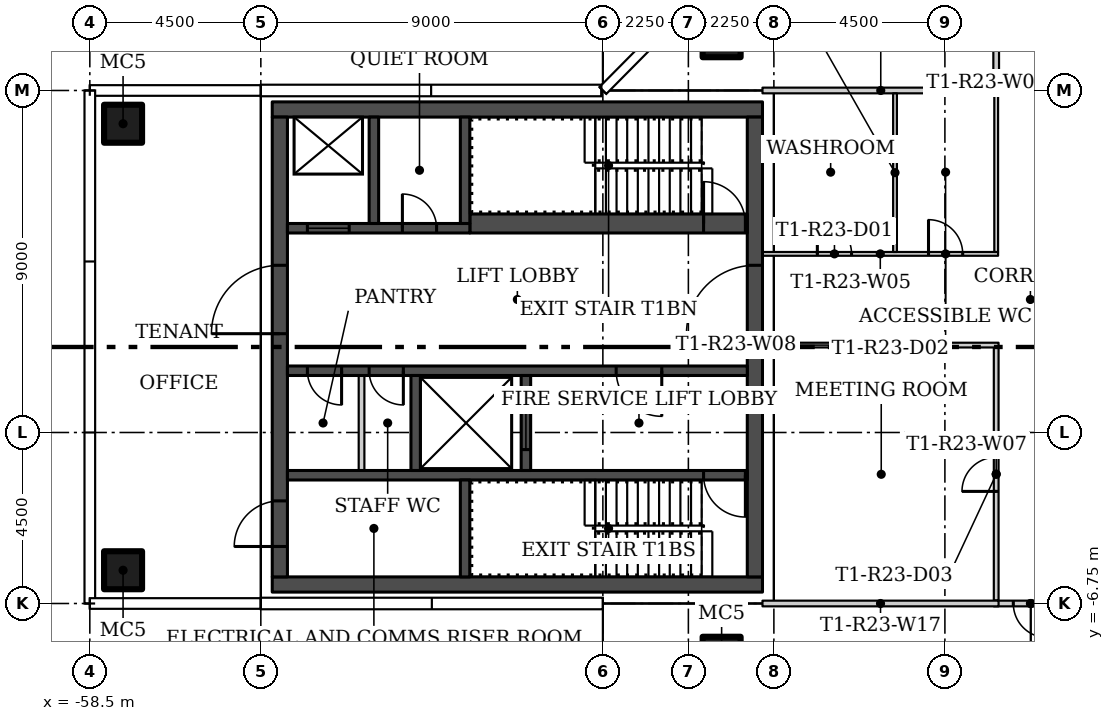
"""IFC4 building model, lengths in metres.
Left out: names, types, materials, properties, quantities, classifications, styles, units other than length and angle.
Written with IfcOpenShell. Run it as: python <this file> out.ifc"""

import sys

from ifc_helpers import new_model, si_unit, direction, frame, frame_2d, origin, origin_2d, place, context, subcontext, project, spatial, rectangle, hollow_rectangle, extrude, element, fill, save


model = new_model("IFC4")
c1 = context("Model", 3, precision=1e-05, world=origin(), true_north=direction((0.0, 1.0)))
c2 = subcontext(c1, "Body", "Model", "MODEL_VIEW")
j1 = project(units=[si_unit("LENGTHUNIT", "METRE"), si_unit("PLANEANGLEUNIT", "RADIAN")], contexts=[c1])
p1 = place(None, origin())
s1 = spatial("IfcSite", under=j1, at=p1, CompositionType="ELEMENT")
p2 = place(p1, origin())
s2 = spatial("IfcBuilding", under=s1, at=p2, CompositionType="ELEMENT")
p3 = place(p2, frame((0.0, 0.0, 210.0)))
s3 = spatial("IfcBuildingStorey", under=s2, at=p3, CompositionType="ELEMENT", Elevation=210.0)
for number, where in (
    (1, (-41.875, 8.125, 0.0)),
    (2, (-41.875, -8.125, 0.0)),
    (3, (-57.625, -5.875, 0.0)),
    (4, (-57.625, 5.875, 0.0)),
):
    element("IfcColumn", number, at=place(p3, frame(where)), inside=s3, PredefinedType="COLUMN", context=c2, shape_type="SweptSolid", body=[
        extrude(hollow_rectangle(XDim=1.0, YDim=1.0, WallThickness=0.04, at=origin_2d()), origin(), (0.0, 0.0, 1.0), 3.55),
    ])
p4 = place(p3, frame((-40.8, 2.45, 0.0)))
e5 = element("IfcWall", 5, at=p4, inside=s3, PredefinedType="PARTITIONING", context=c2, shape_type="SweptSolid", body=[
    extrude(rectangle(XDim=6.2, YDim=0.1, at=frame_2d((3.1, 0.0))), origin(), (0.0, 0.0, 1.0), 3.55),
])
p5 = place(p4, frame((1.444, 0.0, 0.0)))
e6 = element("IfcOpeningElement", 6, at=p5, cuts=e5, PredefinedType="OPENING", context=c2, shape_type="SweptSolid", body=[
    extrude(rectangle(XDim=0.9, YDim=2.1, at=frame_2d((0.45, 1.05))), frame((0.0, 0.06, 0.0), z_axis=(0.0, -1.0, 0.0), x_axis=(1.0, 0.0, 0.0)), (0.0, 0.0, 1.0), 0.12),
])
p6 = place(p4, frame((4.368, 0.0, 0.0)))
e7 = element("IfcOpeningElement", 7, at=p6, cuts=e5, PredefinedType="OPENING", context=c2, shape_type="SweptSolid", body=[
    extrude(rectangle(XDim=0.9, YDim=2.1, at=frame_2d((0.45, 1.05))), frame((0.0, 0.06, 0.0), z_axis=(0.0, -1.0, 0.0), x_axis=(1.0, 0.0, 0.0)), (0.0, 0.0, 1.0), 0.12),
])
p7 = place(p3, frame((-34.65, 2.5, 0.0), z_axis=(0.0, 0.0, 1.0), x_axis=(0.0, 1.0, 0.0)))
e8 = element("IfcWall", 8, at=p7, inside=s3, PredefinedType="PARTITIONING", context=c2, shape_type="SweptSolid", body=[
    extrude(rectangle(XDim=4.175, YDim=0.1, at=frame_2d((2.087, 0.0))), origin(), (0.0, 0.0, 1.0), 3.55),
])
p8 = place(p3, frame((-34.65, -6.675, 0.0), z_axis=(0.0, 0.0, 1.0), x_axis=(0.0, 1.0, 0.0)))
e9 = element("IfcWall", 9, at=p8, inside=s3, PredefinedType="PARTITIONING", context=c2, shape_type="SweptSolid", body=[
    extrude(rectangle(XDim=6.662, YDim=0.125, at=frame_2d((3.331, 0.0))), origin(), (0.0, 0.0, 1.0), 3.55),
])
p9 = place(p8, frame((2.875, 0.0, 0.0)))
e10 = element("IfcOpeningElement", 10, at=p9, cuts=e9, PredefinedType="OPENING", context=c2, shape_type="SweptSolid", body=[
    extrude(rectangle(XDim=0.9, YDim=2.1, at=frame_2d((0.45, 1.05))), frame((0.0, 0.073, 0.0), z_axis=(0.0, -1.0, 0.0), x_axis=(1.0, 0.0, 0.0)), (0.0, 0.0, 1.0), 0.145),
])
p10 = place(p3, frame((-34.588, 0.05, 0.0), z_axis=(0.0, 0.0, 1.0), x_axis=(-1.0, 0.0, 0.0)))
e11 = element("IfcWall", 11, at=p10, inside=s3, PredefinedType="PARTITIONING", context=c2, shape_type="SweptSolid", body=[
    extrude(rectangle(XDim=6.212, YDim=0.125, at=frame_2d((3.106, 0.0))), origin(), (0.0, 0.0, 1.0), 3.55),
])
p11 = place(p3, frame((-34.65, 6.825, 0.0), z_axis=(0.0, 0.0, 1.0), x_axis=(0.0, 1.0, 0.0)))
e12 = element("IfcWall", 12, at=p11, inside=s3, PredefinedType="PARTITIONING", context=c2, shape_type="SweptSolid", body=[
    extrude(rectangle(XDim=4.35, YDim=0.15, at=frame_2d((2.175, 0.0))), origin(), (0.0, 0.0, 1.0), 3.55),
])
p12 = place(p11, frame((1.425, 0.0, 0.0)))
e13 = element("IfcOpeningElement", 13, at=p12, cuts=e12, PredefinedType="OPENING", context=c2, shape_type="SweptSolid", body=[
    extrude(rectangle(XDim=1.5, YDim=2.1, at=frame_2d((0.75, 1.05))), frame((0.0, 0.085, 0.0), z_axis=(0.0, -1.0, 0.0), x_axis=(1.0, 0.0, 0.0)), (0.0, 0.0, 1.0), 0.17),
])
p13 = place(p3, frame((-32.75, -6.75, 0.0), z_axis=(0.0, 0.0, 1.0), x_axis=(-1.0, 0.0, 0.0)))
e14 = element("IfcWall", 14, at=p13, inside=s3, PredefinedType="PARTITIONING", context=c2, shape_type="SweptSolid", body=[
    extrude(rectangle(XDim=1.963, YDim=0.15, at=frame_2d((0.982, 0.0))), origin(), (0.0, 0.0, 1.0), 3.55),
])
p14 = place(p13, frame((0.55, 0.0, 0.0)))
e15 = element("IfcOpeningElement", 15, at=p14, cuts=e14, PredefinedType="OPENING", context=c2, shape_type="SweptSolid", body=[
    extrude(rectangle(XDim=0.9, YDim=2.1, at=frame_2d((0.45, 1.05))), frame((0.0, 0.085, 0.0), z_axis=(0.0, -1.0, 0.0), x_axis=(1.0, 0.0, 0.0)), (0.0, 0.0, 1.0), 0.17),
])
p15 = place(p3, frame((-34.575, 6.75, 0.0), z_axis=(0.0, 0.0, 1.0), x_axis=(-1.0, 0.0, 0.0)))
e16 = element("IfcWall", 16, at=p15, inside=s3, PredefinedType="PARTITIONING", context=c2, shape_type="SweptSolid", body=[
    extrude(rectangle(XDim=6.225, YDim=0.15, at=frame_2d((3.112, 0.0))), origin(), (0.0, 0.0, 1.0), 3.55),
])
p16 = place(p3, frame((-37.312, 2.5, 0.0), z_axis=(0.0, 0.0, 1.0), x_axis=(0.0, 1.0, 0.0)))
e17 = element("IfcWall", 17, at=p16, inside=s3, PredefinedType="PARTITIONING", context=c2, shape_type="SweptSolid", body=[
    extrude(rectangle(XDim=4.175, YDim=0.1, at=frame_2d((2.087, 0.0))), origin(), (0.0, 0.0, 1.0), 3.55),
])
p17 = place(p3, frame((-40.8, -6.75, 0.0)))
e18 = element("IfcWall", 18, at=p17, inside=s3, PredefinedType="PARTITIONING", context=c2, shape_type="SweptSolid", body=[
    extrude(rectangle(XDim=6.212, YDim=0.15, at=frame_2d((3.106, 0.0))), origin(), (0.0, 0.0, 1.0), 3.55),
])
for number, where, z_axis, x_axis in (
    (19, (-40.8, -6.25, 0.0), (0.0, 0.0, 1.0), (-1.0, 0.0, 0.0)),
    (20, (-40.8, 6.25, 0.0), (0.0, 0.0, 1.0), (-1.0, 0.0, 0.0)),
):
    element("IfcWall", number, at=place(p3, frame(where, z_axis=z_axis, x_axis=x_axis)), inside=s3, PredefinedType="SHEAR", context=c2, shape_type="SweptSolid", body=[
        extrude(rectangle(XDim=12.9, YDim=0.4, at=frame_2d((6.45, 0.0))), origin(), (0.0, 0.0, 1.0), 3.55),
    ])
p18 = place(p3, frame((-41.0, -6.05, 0.0), z_axis=(0.0, 0.0, 1.0), x_axis=(0.0, 1.0, 0.0)))
e21 = element("IfcWall", 21, at=p18, inside=s3, PredefinedType="SHEAR", context=c2, shape_type="SweptSolid", body=[
    extrude(rectangle(XDim=12.1, YDim=0.4, at=frame_2d((6.05, 0.0))), origin(), (0.0, 0.0, 1.0), 3.55),
])
p19 = place(p18, frame((6.4, 0.0, 0.0)))
e22 = element("IfcOpeningElement", 22, at=p19, cuts=e21, PredefinedType="OPENING", context=c2, shape_type="SweptSolid", body=[
    extrude(rectangle(XDim=1.8, YDim=2.4, at=frame_2d((0.9, 1.2))), frame((0.0, 0.21, 0.0), z_axis=(0.0, -1.0, 0.0), x_axis=(1.0, 0.0, 0.0)), (0.0, 0.0, 1.0), 0.42),
])
p20 = place(p3, frame((-53.5, -6.05, 0.0), z_axis=(0.0, 0.0, 1.0), x_axis=(0.0, 1.0, 0.0)))
e23 = element("IfcWall", 23, at=p20, inside=s3, PredefinedType="SHEAR", context=c2, shape_type="SweptSolid", body=[
    extrude(rectangle(XDim=12.1, YDim=0.4, at=frame_2d((6.05, 0.0))), origin(), (0.0, 0.0, 1.0), 3.55),
])
p21 = place(p20, frame((0.8, 0.0, 0.0)))
e24 = element("IfcOpeningElement", 24, at=p21, cuts=e23, PredefinedType="OPENING", context=c2, shape_type="SweptSolid", body=[
    extrude(rectangle(XDim=1.2, YDim=2.1, at=frame_2d((0.6, 1.05))), frame((0.0, 0.21, 0.0), z_axis=(0.0, -1.0, 0.0), x_axis=(1.0, 0.0, 0.0)), (0.0, 0.0, 1.0), 0.42),
])
p22 = place(p20, frame((6.4, 0.0, 0.0)))
e25 = element("IfcOpeningElement", 25, at=p22, cuts=e23, PredefinedType="OPENING", context=c2, shape_type="SweptSolid", body=[
    extrude(rectangle(XDim=1.8, YDim=2.4, at=frame_2d((0.9, 1.2))), frame((0.0, 0.21, 0.0), z_axis=(0.0, -1.0, 0.0), x_axis=(1.0, 0.0, 0.0)), (0.0, 0.0, 1.0), 0.42),
])
p23 = place(p3, frame((-41.2, -3.375, 0.0), z_axis=(0.0, 0.0, 1.0), x_axis=(-1.0, 0.0, 0.0)))
e26 = element("IfcWall", 26, at=p23, inside=s3, PredefinedType="SHEAR", context=c2, shape_type="SweptSolid", body=[
    extrude(rectangle(XDim=12.1, YDim=0.25, at=frame_2d((6.05, 0.0))), origin(), (0.0, 0.0, 1.0), 3.55),
])
p24 = place(p23, frame((0.05, 0.0, 0.0)))
e27 = element("IfcOpeningElement", 27, at=p24, cuts=e26, PredefinedType="OPENING", context=c2, shape_type="SweptSolid", body=[
    extrude(rectangle(XDim=1.1, YDim=2.1, at=frame_2d((0.55, 1.05))), frame((0.0, 0.135, 0.0), z_axis=(0.0, -1.0, 0.0), x_axis=(1.0, 0.0, 0.0)), (0.0, 0.0, 1.0), 0.27),
])
p25 = place(p3, frame((-48.625, -6.05, 0.0), z_axis=(0.0, 0.0, 1.0), x_axis=(0.0, 1.0, 0.0)))
e28 = element("IfcWall", 28, at=p25, inside=s3, PredefinedType="SHEAR", context=c2, shape_type="SweptSolid", body=[
    extrude(rectangle(XDim=2.55, YDim=0.25, at=frame_2d((1.275, 0.0))), origin(), (0.0, 0.0, 1.0), 3.55),
])
p26 = place(p3, frame((-41.2, -0.625, 0.0), z_axis=(0.0, 0.0, 1.0), x_axis=(-1.0, 0.0, 0.0)))
e29 = element("IfcWall", 29, at=p26, inside=s3, PredefinedType="SHEAR", context=c2, shape_type="SweptSolid", body=[
    extrude(rectangle(XDim=12.1, YDim=0.25, at=frame_2d((6.05, 0.0))), origin(), (0.0, 0.0, 1.0), 3.55),
])
p27 = place(p26, frame((2.25, 0.0, 0.0)))
e30 = element("IfcOpeningElement", 30, at=p27, cuts=e29, PredefinedType="OPENING", context=c2, shape_type="SweptSolid", body=[
    extrude(rectangle(XDim=1.2, YDim=2.1, at=frame_2d((0.6, 1.05))), frame((0.0, 0.135, 0.0), z_axis=(0.0, -1.0, 0.0), x_axis=(1.0, 0.0, 0.0)), (0.0, 0.0, 1.0), 0.27),
])
p28 = place(p26, frame((9.05, 0.0, 0.0)))
e31 = element("IfcOpeningElement", 31, at=p28, cuts=e29, PredefinedType="OPENING", context=c2, shape_type="SweptSolid", body=[
    extrude(rectangle(XDim=0.9, YDim=2.1, at=frame_2d((0.45, 1.05))), frame((0.0, 0.135, 0.0), z_axis=(0.0, -1.0, 0.0), x_axis=(1.0, 0.0, 0.0)), (0.0, 0.0, 1.0), 0.27),
])
p29 = place(p26, frame((10.675, 0.0, 0.0)))
e32 = element("IfcOpeningElement", 32, at=p29, cuts=e29, PredefinedType="OPENING", context=c2, shape_type="SweptSolid", body=[
    extrude(rectangle(XDim=0.9, YDim=2.1, at=frame_2d((0.45, 1.05))), frame((0.0, 0.135, 0.0), z_axis=(0.0, -1.0, 0.0), x_axis=(1.0, 0.0, 0.0)), (0.0, 0.0, 1.0), 0.27),
])
p30 = place(p3, frame((-47.025, -3.25, 0.0), z_axis=(0.0, 0.0, 1.0), x_axis=(0.0, 1.0, 0.0)))
e33 = element("IfcWall", 33, at=p30, inside=s3, PredefinedType="SHEAR", context=c2, shape_type="SweptSolid", body=[
    extrude(rectangle(XDim=2.5, YDim=0.25, at=frame_2d((1.25, 0.0))), origin(), (0.0, 0.0, 1.0), 3.55),
])
p31 = place(p30, frame((0.55, 0.0, 0.0)))
e34 = element("IfcOpeningElement", 34, at=p31, cuts=e33, PredefinedType="OPENING", context=c2, shape_type="SweptSolid", body=[
    extrude(rectangle(XDim=1.4, YDim=2.4, at=frame_2d((0.7, 1.2))), frame((0.0, 0.135, 0.0), z_axis=(0.0, -1.0, 0.0), x_axis=(1.0, 0.0, 0.0)), (0.0, 0.0, 1.0), 0.27),
])
p32 = place(p3, frame((-49.925, -3.25, 0.0), z_axis=(0.0, 0.0, 1.0), x_axis=(0.0, 1.0, 0.0)))
e35 = element("IfcWall", 35, at=p32, inside=s3, PredefinedType="SHEAR", context=c2, shape_type="SweptSolid", body=[
    extrude(rectangle(XDim=2.5, YDim=0.25, at=frame_2d((1.25, 0.0))), origin(), (0.0, 0.0, 1.0), 3.55),
])
p33 = place(p3, frame((-51.35, -3.25, 0.0), z_axis=(0.0, 0.0, 1.0), x_axis=(0.0, 1.0, 0.0)))
e36 = element("IfcWall", 36, at=p33, inside=s3, PredefinedType="PARTITIONING", context=c2, shape_type="SweptSolid", body=[
    extrude(rectangle(XDim=2.5, YDim=0.15, at=frame_2d((1.25, 0.0))), origin(), (0.0, 0.0, 1.0), 3.55),
])
p34 = place(p3, frame((-48.5, 3.25, 0.0)))
e37 = element("IfcWall", 37, at=p34, inside=s3, PredefinedType="SHEAR", context=c2, shape_type="SweptSolid", body=[
    extrude(rectangle(XDim=7.3, YDim=0.5, at=frame_2d((3.65, 0.0))), origin(), (0.0, 0.0, 1.0), 3.55),
])
p35 = place(p34, frame((6.15, 0.0, 0.0)))
e38 = element("IfcOpeningElement", 38, at=p35, cuts=e37, PredefinedType="OPENING", context=c2, shape_type="SweptSolid", body=[
    extrude(rectangle(XDim=1.1, YDim=2.1, at=frame_2d((0.55, 1.05))), frame((0.0, 0.26, 0.0), z_axis=(0.0, -1.0, 0.0), x_axis=(1.0, 0.0, 0.0)), (0.0, 0.0, 1.0), 0.52),
])
p36 = place(p3, frame((-53.3, 3.125, 0.0)))
e39 = element("IfcWall", 39, at=p36, inside=s3, PredefinedType="SHEAR", context=c2, shape_type="SweptSolid", body=[
    extrude(rectangle(XDim=4.8, YDim=0.25, at=frame_2d((2.4, 0.0))), origin(), (0.0, 0.0, 1.0), 3.55),
])
p37 = place(p36, frame((0.525, 0.0, 0.0)))
e40 = element("IfcOpeningElement", 40, at=p37, cuts=e39, PredefinedType="OPENING", context=c2, shape_type="SweptSolid", body=[
    extrude(rectangle(XDim=1.1, YDim=2.1, at=frame_2d((0.55, 1.05))), frame((0.0, 0.135, 0.0), z_axis=(0.0, -1.0, 0.0), x_axis=(1.0, 0.0, 0.0)), (0.0, 0.0, 1.0), 0.27),
])
p38 = place(p36, frame((3.025, 0.0, 0.0)))
e41 = element("IfcOpeningElement", 41, at=p38, cuts=e39, PredefinedType="OPENING", context=c2, shape_type="SweptSolid", body=[
    extrude(rectangle(XDim=0.9, YDim=2.1, at=frame_2d((0.45, 1.05))), frame((0.0, 0.135, 0.0), z_axis=(0.0, -1.0, 0.0), x_axis=(1.0, 0.0, 0.0)), (0.0, 0.0, 1.0), 0.27),
])
for number, where, z_axis, x_axis in (
    (42, (-48.625, 3.25, 0.0), (0.0, 0.0, 1.0), (0.0, 1.0, 0.0)),
    (43, (-51.025, 3.25, 0.0), (0.0, 0.0, 1.0), (0.0, 1.0, 0.0)),
):
    element("IfcWall", number, at=place(p3, frame(where, z_axis=z_axis, x_axis=x_axis)), inside=s3, PredefinedType="SHEAR", context=c2, shape_type="SweptSolid", body=[
        extrude(rectangle(XDim=2.8, YDim=0.25, at=frame_2d((1.4, 0.0))), origin(), (0.0, 0.0, 1.0), 3.55),
    ])
p39 = place(p5, origin())
e44 = element("IfcDoor", 44, at=p39, inside=s3, OperationType="SINGLE_SWING_LEFT", PredefinedType="DOOR", context=c2, shape_type="SweptSolid", body=[
    extrude(rectangle(XDim=0.9, YDim=2.1, at=frame_2d((0.45, 1.05))), frame((0.0, 0.025, 0.0), z_axis=(0.0, -1.0, 0.0), x_axis=(1.0, 0.0, 0.0)), (0.0, 0.0, 1.0), 0.05),
])
fill(e6, e44)
p40 = place(p6, origin())
e45 = element("IfcDoor", 45, at=p40, inside=s3, OperationType="SINGLE_SWING_RIGHT", PredefinedType="DOOR", context=c2, shape_type="SweptSolid", body=[
    extrude(rectangle(XDim=0.9, YDim=2.1, at=frame_2d((0.45, 1.05))), frame((0.0, 0.025, 0.0), z_axis=(0.0, -1.0, 0.0), x_axis=(1.0, 0.0, 0.0)), (0.0, 0.0, 1.0), 0.05),
])
fill(e7, e45)
p41 = place(p9, origin())
e46 = element("IfcDoor", 46, at=p41, inside=s3, OperationType="SINGLE_SWING_RIGHT", PredefinedType="DOOR", context=c2, shape_type="SweptSolid", body=[
    extrude(rectangle(XDim=0.9, YDim=2.1, at=frame_2d((0.45, 1.05))), frame((0.0, 0.025, 0.0), z_axis=(0.0, -1.0, 0.0), x_axis=(1.0, 0.0, 0.0)), (0.0, 0.0, 1.0), 0.05),
])
fill(e10, e46)
p42 = place(p14, origin())
e47 = element("IfcDoor", 47, at=p42, inside=s3, OperationType="SINGLE_SWING_LEFT", PredefinedType="DOOR", context=c2, shape_type="SweptSolid", body=[
    extrude(rectangle(XDim=0.9, YDim=2.1, at=frame_2d((0.45, 1.05))), frame((0.0, 0.025, 0.0), z_axis=(0.0, -1.0, 0.0), x_axis=(1.0, 0.0, 0.0)), (0.0, 0.0, 1.0), 0.05),
])
fill(e15, e47)
p43 = place(p19, origin())
e48 = element("IfcDoor", 48, at=p43, inside=s3, OperationType="DOUBLE_DOOR_SINGLE_SWING", PredefinedType="DOOR", context=c2, shape_type="SweptSolid", body=[
    extrude(rectangle(XDim=1.8, YDim=2.4, at=frame_2d((0.9, 1.2))), frame((0.0, 0.025, 0.0), z_axis=(0.0, -1.0, 0.0), x_axis=(1.0, 0.0, 0.0)), (0.0, 0.0, 1.0), 0.05),
])
fill(e22, e48)
p44 = place(p21, origin())
e49 = element("IfcDoor", 49, at=p44, inside=s3, OperationType="SINGLE_SWING_LEFT", PredefinedType="DOOR", context=c2, shape_type="SweptSolid", body=[
    extrude(rectangle(XDim=1.2, YDim=2.1, at=frame_2d((0.6, 1.05))), frame((0.0, 0.025, 0.0), z_axis=(0.0, -1.0, 0.0), x_axis=(1.0, 0.0, 0.0)), (0.0, 0.0, 1.0), 0.05),
])
fill(e24, e49)
p45 = place(p22, origin())
e50 = element("IfcDoor", 50, at=p45, inside=s3, OperationType="DOUBLE_DOOR_SINGLE_SWING", PredefinedType="DOOR", context=c2, shape_type="SweptSolid", body=[
    extrude(rectangle(XDim=1.8, YDim=2.4, at=frame_2d((0.9, 1.2))), frame((0.0, 0.025, 0.0), z_axis=(0.0, -1.0, 0.0), x_axis=(1.0, 0.0, 0.0)), (0.0, 0.0, 1.0), 0.05),
])
fill(e25, e50)
p46 = place(p24, origin())
e51 = element("IfcDoor", 51, at=p46, inside=s3, OperationType="SINGLE_SWING_LEFT", PredefinedType="DOOR", context=c2, shape_type="SweptSolid", body=[
    extrude(rectangle(XDim=1.1, YDim=2.1, at=frame_2d((0.55, 1.05))), frame((0.0, 0.025, 0.0), z_axis=(0.0, -1.0, 0.0), x_axis=(1.0, 0.0, 0.0)), (0.0, 0.0, 1.0), 0.05),
])
fill(e27, e51)
p47 = place(p27, origin())
e52 = element("IfcDoor", 52, at=p47, inside=s3, OperationType="SINGLE_SWING_LEFT", PredefinedType="DOOR", context=c2, shape_type="SweptSolid", body=[
    extrude(rectangle(XDim=1.2, YDim=2.1, at=frame_2d((0.6, 1.05))), frame((0.0, 0.025, 0.0), z_axis=(0.0, -1.0, 0.0), x_axis=(1.0, 0.0, 0.0)), (0.0, 0.0, 1.0), 0.05),
])
fill(e30, e52)
p48 = place(p28, origin())
e53 = element("IfcDoor", 53, at=p48, inside=s3, OperationType="SINGLE_SWING_RIGHT", PredefinedType="DOOR", context=c2, shape_type="SweptSolid", body=[
    extrude(rectangle(XDim=0.9, YDim=2.1, at=frame_2d((0.45, 1.05))), frame((0.0, 0.025, 0.0), z_axis=(0.0, -1.0, 0.0), x_axis=(1.0, 0.0, 0.0)), (0.0, 0.0, 1.0), 0.05),
])
fill(e31, e53)
p49 = place(p29, origin())
e54 = element("IfcDoor", 54, at=p49, inside=s3, OperationType="SINGLE_SWING_RIGHT", PredefinedType="DOOR", context=c2, shape_type="SweptSolid", body=[
    extrude(rectangle(XDim=0.9, YDim=2.1, at=frame_2d((0.45, 1.05))), frame((0.0, 0.025, 0.0), z_axis=(0.0, -1.0, 0.0), x_axis=(1.0, 0.0, 0.0)), (0.0, 0.0, 1.0), 0.05),
])
fill(e32, e54)
p50 = place(p31, origin())
e55 = element("IfcDoor", 55, at=p50, inside=s3, OperationType="SLIDING_TO_LEFT", PredefinedType="DOOR", context=c2, shape_type="SweptSolid", body=[
    extrude(rectangle(XDim=1.4, YDim=2.4, at=frame_2d((0.7, 1.2))), frame((0.0, 0.025, 0.0), z_axis=(0.0, -1.0, 0.0), x_axis=(1.0, 0.0, 0.0)), (0.0, 0.0, 1.0), 0.05),
])
fill(e34, e55)
p51 = place(p35, origin())
e56 = element("IfcDoor", 56, at=p51, inside=s3, OperationType="SINGLE_SWING_RIGHT", PredefinedType="DOOR", context=c2, shape_type="SweptSolid", body=[
    extrude(rectangle(XDim=1.1, YDim=2.1, at=frame_2d((0.55, 1.05))), frame((0.0, 0.025, 0.0), z_axis=(0.0, -1.0, 0.0), x_axis=(1.0, 0.0, 0.0)), (0.0, 0.0, 1.0), 0.05),
])
fill(e38, e56)
p52 = place(p37, origin())
e57 = element("IfcDoor", 57, at=p52, inside=s3, OperationType="SLIDING_TO_LEFT", PredefinedType="DOOR", context=c2, shape_type="SweptSolid", body=[
    extrude(rectangle(XDim=1.1, YDim=2.1, at=frame_2d((0.55, 1.05))), frame((0.0, 0.025, 0.0), z_axis=(0.0, -1.0, 0.0), x_axis=(1.0, 0.0, 0.0)), (0.0, 0.0, 1.0), 0.05),
])
fill(e40, e57)
p53 = place(p38, origin())
e58 = element("IfcDoor", 58, at=p53, inside=s3, OperationType="SINGLE_SWING_RIGHT", PredefinedType="DOOR", context=c2, shape_type="SweptSolid", body=[
    extrude(rectangle(XDim=0.9, YDim=2.1, at=frame_2d((0.45, 1.05))), frame((0.0, 0.025, 0.0), z_axis=(0.0, -1.0, 0.0), x_axis=(1.0, 0.0, 0.0)), (0.0, 0.0, 1.0), 0.05),
])
fill(e41, e58)
save(model, sys.argv[1])
